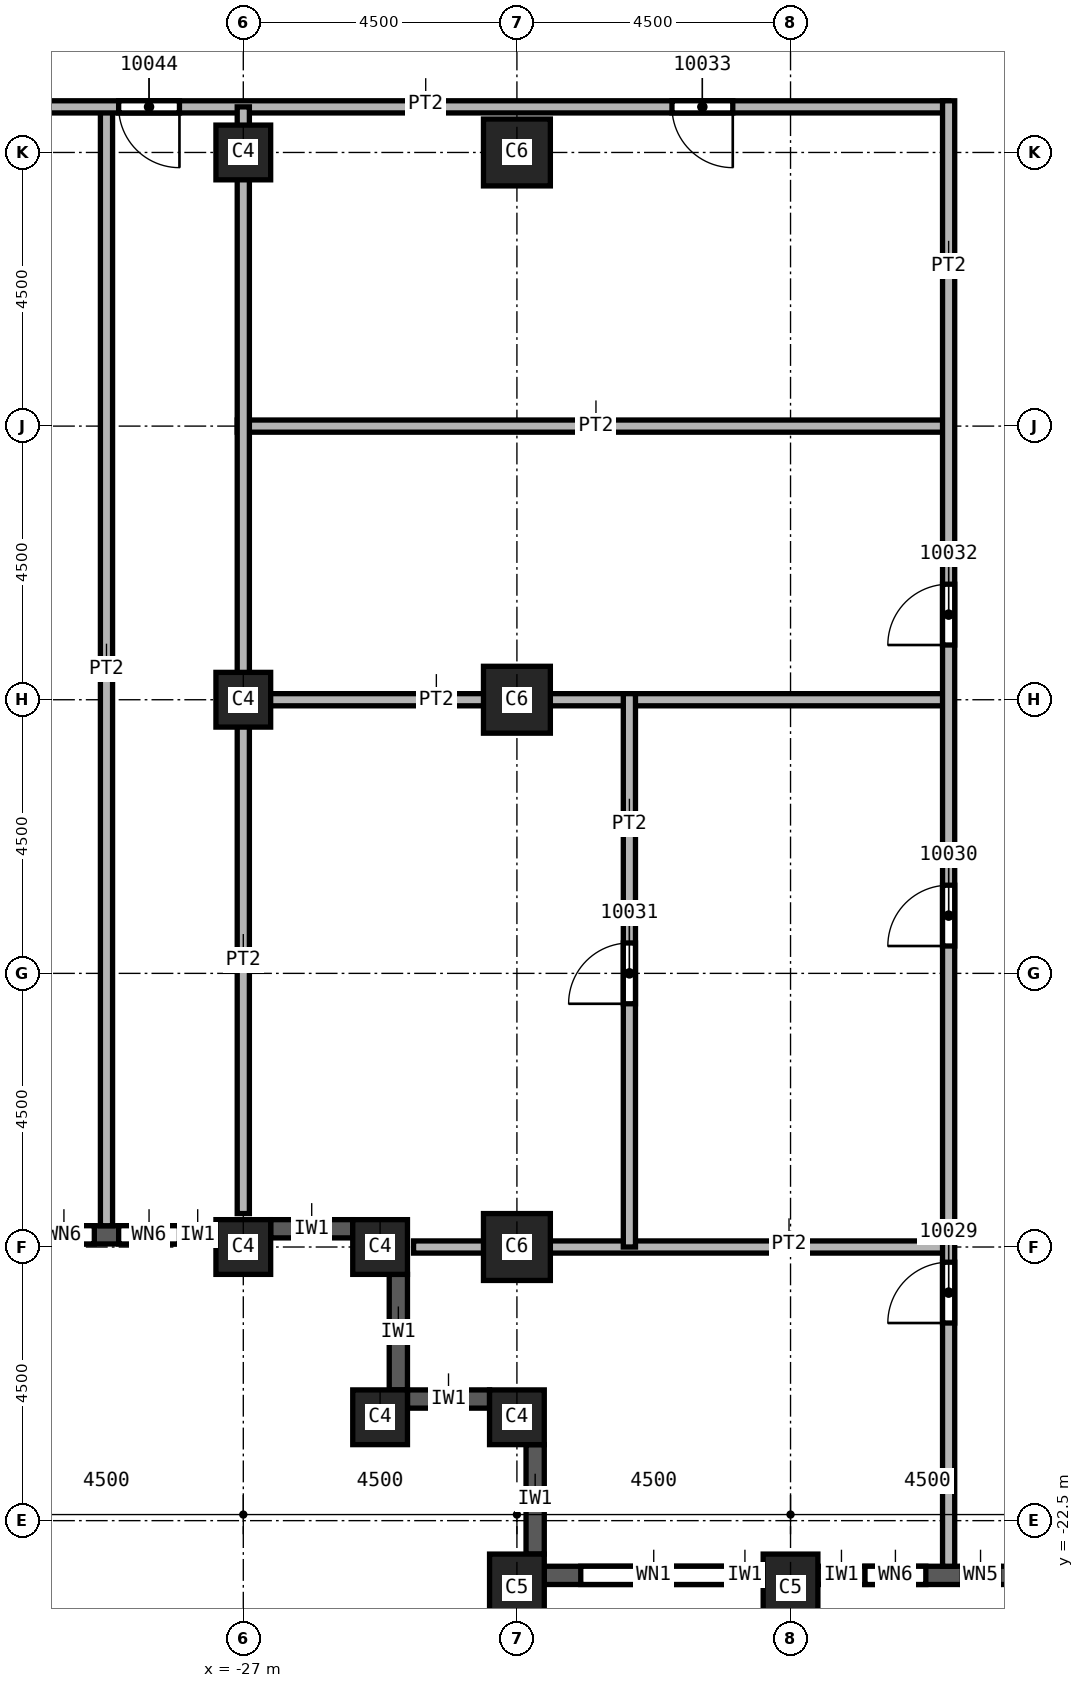
"""IFC4 building model, lengths in metres.
Left out: names, types, materials, properties, quantities, classifications, styles, units other than length and angle.
Written with IfcOpenShell. Run it as: python <this file> out.ifc"""

import sys

from ifc_helpers import new_model, si_unit, direction, frame, frame_2d, origin, origin_2d, place, context, subcontext, project, spatial, rectangle, extrude, element, fill, save


model = new_model("IFC4")
c1 = context("Model", 3, precision=1e-05, world=origin(), true_north=direction((0.0, 1.0)))
c2 = subcontext(c1, "Body", "Model", "MODEL_VIEW")
j1 = project(units=[si_unit("LENGTHUNIT", "METRE"), si_unit("PLANEANGLEUNIT", "RADIAN")], contexts=[c1])
p1 = place(None, origin())
s1 = spatial("IfcSite", under=j1, at=p1, CompositionType="ELEMENT")
p2 = place(p1, origin())
s2 = spatial("IfcBuilding", under=s1, at=p2, CompositionType="ELEMENT")
p3 = place(p2, frame((0.0, 0.0, 170.0)))
s3 = spatial("IfcBuildingStorey", under=s2, at=p3, CompositionType="ELEMENT", Elevation=170.0)
for number, where, z_axis, x_axis in (
    (1, (-22.5, 0.0, 0.0), (0.0, 0.0, 1.0), (1.0, 0.0, 0.0)),
    (2, (-22.5, -9.0, 0.0), (0.0, 0.0, 1.0), (1.0, 0.0, 0.0)),
    (3, (-22.5, -18.0, 0.0), (0.0, 0.0, 1.0), (1.0, 0.0, 0.0)),
):
    element("IfcColumn", number, at=place(p3, frame(where, z_axis=z_axis, x_axis=x_axis)), inside=s3, PredefinedType="COLUMN", context=c2, shape_type="SweptSolid", body=[
        extrude(rectangle(XDim=1.1, YDim=1.1, at=origin_2d()), origin(), (0.0, 0.0, 1.0), 3.7),
    ])
for number, where, z_axis, x_axis in (
    (4, (-18.0, -23.6, 0.0), (0.0, 0.0, 1.0), (1.0, 0.0, 0.0)),
    (5, (-22.5, -23.6, 0.0), (0.0, 0.0, 1.0), (1.0, 0.0, 0.0)),
):
    element("IfcColumn", number, at=place(p3, frame(where, z_axis=z_axis, x_axis=x_axis)), inside=s3, PredefinedType="COLUMN", context=c2, shape_type="SweptSolid", body=[
        extrude(rectangle(XDim=0.9, YDim=1.1, at=origin_2d()), origin(), (0.0, 0.0, 1.0), 3.7),
    ])
for number, where, z_axis, x_axis in (
    (6, (-27.0, 0.0, 0.0), (0.0, 0.0, 1.0), (1.0, 0.0, 0.0)),
    (7, (-27.0, -9.0, 0.0), (0.0, 0.0, 1.0), (1.0, 0.0, 0.0)),
    (8, (-27.0, -18.0, 0.0), (0.0, 0.0, 1.0), (1.0, 0.0, 0.0)),
    (9, (-22.5, -20.8, 0.0), (0.0, 0.0, 1.0), (1.0, 0.0, 0.0)),
    (10, (-24.75, -20.8, 0.0), (0.0, 0.0, 1.0), (1.0, 0.0, 0.0)),
    (11, (-24.75, -18.0, 0.0), (0.0, 0.0, 1.0), (1.0, 0.0, 0.0)),
):
    element("IfcColumn", number, at=place(p3, frame(where, z_axis=z_axis, x_axis=x_axis)), inside=s3, PredefinedType="COLUMN", context=c2, shape_type="SweptSolid", body=[
        extrude(rectangle(XDim=0.9, YDim=0.9, at=origin_2d()), origin(), (0.0, 0.0, 1.0), 3.7),
    ])
p4 = place(p3, frame((-31.05, -17.8, 0.0), z_axis=(0.0, 0.0, 1.0), x_axis=(1.0, 0.0, 0.0)))
e12 = element("IfcWall", 12, at=p4, inside=s3, PredefinedType="SOLIDWALL", context=c2, shape_type="SweptSolid", body=[
    extrude(rectangle(XDim=3.6, YDim=0.3, at=frame_2d((1.8, 0.0))), origin(), (0.0, 0.0, 1.0), 3.1),
])
p5 = place(p4, frame((0.6, 0.0, 0.8)))
e13 = element("IfcOpeningElement", 13, at=p5, cuts=e12, PredefinedType="OPENING", context=c2, shape_type="SweptSolid", body=[
    extrude(rectangle(XDim=1.0, YDim=1.95, at=frame_2d((0.5, 0.975))), frame((0.0, 0.15, 0.0), z_axis=(0.0, -1.0, 0.0), x_axis=(1.0, 0.0, 0.0)), (0.0, 0.0, 1.0), 0.3),
])
p6 = place(p4, frame((2.0, 0.0, 0.8)))
e14 = element("IfcOpeningElement", 14, at=p6, cuts=e12, PredefinedType="OPENING", context=c2, shape_type="SweptSolid", body=[
    extrude(rectangle(XDim=1.0, YDim=1.95, at=frame_2d((0.5, 0.975))), frame((0.0, 0.15, 0.0), z_axis=(0.0, -1.0, 0.0), x_axis=(1.0, 0.0, 0.0)), (0.0, 0.0, 1.0), 0.3),
])
p7 = place(p3, frame((-26.55, -17.7, 0.0), z_axis=(0.0, 0.0, 1.0), x_axis=(1.0, 0.0, 0.0)))
e15 = element("IfcWall", 15, at=p7, inside=s3, PredefinedType="SOLIDWALL", context=c2, shape_type="SweptSolid", body=[
    extrude(rectangle(XDim=1.35, YDim=0.3, at=frame_2d((0.675, 0.0))), origin(), (0.0, 0.0, 1.0), 3.1),
])
p8 = place(p3, frame((-24.45, -18.45, 0.0), z_axis=(0.0, 0.0, 1.0), x_axis=(0.0, -1.0, 0.0)))
e16 = element("IfcWall", 16, at=p8, inside=s3, PredefinedType="SOLIDWALL", context=c2, shape_type="SweptSolid", body=[
    extrude(rectangle(XDim=1.9, YDim=0.3, at=frame_2d((0.95, 0.0))), origin(), (0.0, 0.0, 1.0), 3.1),
])
p9 = place(p3, frame((-24.3, -20.5, 0.0), z_axis=(0.0, 0.0, 1.0), x_axis=(1.0, 0.0, 0.0)))
e17 = element("IfcWall", 17, at=p9, inside=s3, PredefinedType="SOLIDWALL", context=c2, shape_type="SweptSolid", body=[
    extrude(rectangle(XDim=1.35, YDim=0.3, at=frame_2d((0.675, 0.0))), origin(), (0.0, 0.0, 1.0), 3.1),
])
p10 = place(p3, frame((-22.2, -21.25, 0.0), z_axis=(0.0, 0.0, 1.0), x_axis=(0.0, -1.0, 0.0)))
e18 = element("IfcWall", 18, at=p10, inside=s3, PredefinedType="SOLIDWALL", context=c2, shape_type="SweptSolid", body=[
    extrude(rectangle(XDim=1.8, YDim=0.3, at=frame_2d((0.9, 0.0))), origin(), (0.0, 0.0, 1.0), 3.1),
])
p11 = place(p3, frame((-22.05, -23.4, 0.0), z_axis=(0.0, 0.0, 1.0), x_axis=(1.0, 0.0, 0.0)))
e19 = element("IfcWall", 19, at=p11, inside=s3, PredefinedType="SOLIDWALL", context=c2, shape_type="SweptSolid", body=[
    extrude(rectangle(XDim=3.6, YDim=0.3, at=frame_2d((1.8, 0.0))), origin(), (0.0, 0.0, 1.0), 3.1),
])
p12 = place(p11, frame((0.6, 0.0, 0.8)))
e20 = element("IfcOpeningElement", 20, at=p12, cuts=e19, PredefinedType="OPENING", context=c2, shape_type="SweptSolid", body=[
    extrude(rectangle(XDim=2.4, YDim=1.95, at=frame_2d((1.2, 0.975))), frame((0.0, 0.15, 0.0), z_axis=(0.0, -1.0, 0.0), x_axis=(1.0, 0.0, 0.0)), (0.0, 0.0, 1.0), 0.3),
])
p13 = place(p3, frame((-17.55, -23.4, 0.0), z_axis=(0.0, 0.0, 1.0), x_axis=(1.0, 0.0, 0.0)))
e21 = element("IfcWall", 21, at=p13, inside=s3, PredefinedType="SOLIDWALL", context=c2, shape_type="SweptSolid", body=[
    extrude(rectangle(XDim=3.6, YDim=0.3, at=frame_2d((1.8, 0.0))), origin(), (0.0, 0.0, 1.0), 3.1),
])
p14 = place(p13, frame((0.775, 0.0, 0.8)))
e22 = element("IfcOpeningElement", 22, at=p14, cuts=e21, PredefinedType="OPENING", context=c2, shape_type="SweptSolid", body=[
    extrude(rectangle(XDim=1.0, YDim=1.95, at=frame_2d((0.5, 0.975))), frame((0.0, 0.15, 0.0), z_axis=(0.0, -1.0, 0.0), x_axis=(1.0, 0.0, 0.0)), (0.0, 0.0, 1.0), 0.3),
])
p15 = place(p13, frame((2.375, 0.0, 0.8)))
e23 = element("IfcOpeningElement", 23, at=p15, cuts=e21, PredefinedType="OPENING", context=c2, shape_type="SweptSolid", body=[
    extrude(rectangle(XDim=0.6, YDim=1.95, at=frame_2d((0.3, 0.975))), frame((0.0, 0.15, 0.0), z_axis=(0.0, -1.0, 0.0), x_axis=(1.0, 0.0, 0.0)), (0.0, 0.0, 1.0), 0.3),
])
p16 = place(p3, frame((-29.25, 0.75, 0.0), z_axis=(0.0, 0.0, 1.0), x_axis=(0.0, -1.0, 0.0)))
e24 = element("IfcWall", 24, at=p16, inside=s3, PredefinedType="PARTITIONING", context=c2, shape_type="SweptSolid", body=[
    extrude(rectangle(XDim=18.4, YDim=0.2, at=frame_2d((9.2, 0.0))), origin(), (0.0, 0.0, 1.0), 3.7),
])
p17 = place(p3, frame((-15.4, 0.75, 0.0), z_axis=(0.0, 0.0, 1.0), x_axis=(-1.0, 0.0, 0.0)))
e25 = element("IfcWall", 25, at=p17, inside=s3, PredefinedType="PARTITIONING", context=c2, shape_type="SweptSolid", body=[
    extrude(rectangle(XDim=18.45, YDim=0.2, at=frame_2d((9.225, 0.0))), origin(), (0.0, 0.0, 1.0), 3.7),
])
p18 = place(p17, frame((3.55, 0.0, 0.0)))
e26 = element("IfcOpeningElement", 26, at=p18, cuts=e25, PredefinedType="OPENING", context=c2, shape_type="SweptSolid", body=[
    extrude(rectangle(XDim=1.0, YDim=2.1, at=frame_2d((0.5, 1.05))), frame((0.0, 0.1, 0.0), z_axis=(0.0, -1.0, 0.0), x_axis=(1.0, 0.0, 0.0)), (0.0, 0.0, 1.0), 0.2),
])
p19 = place(p17, frame((12.65, 0.0, 0.0)))
e27 = element("IfcOpeningElement", 27, at=p19, cuts=e25, PredefinedType="OPENING", context=c2, shape_type="SweptSolid", body=[
    extrude(rectangle(XDim=1.0, YDim=2.1, at=frame_2d((0.5, 1.05))), frame((0.0, 0.1, 0.0), z_axis=(0.0, -1.0, 0.0), x_axis=(1.0, 0.0, 0.0)), (0.0, 0.0, 1.0), 0.2),
])
for number, where, z_axis, x_axis in (
    (28, (-27.1, -9.0, 0.0), (0.0, 0.0, 1.0), (1.0, 0.0, 0.0)),
    (29, (-27.1, -4.5, 0.0), (0.0, 0.0, 1.0), (1.0, 0.0, 0.0)),
):
    element("IfcWall", number, at=place(p3, frame(where, z_axis=z_axis, x_axis=x_axis)), inside=s3, PredefinedType="PARTITIONING", context=c2, shape_type="SweptSolid", body=[
        extrude(rectangle(XDim=11.7, YDim=0.2, at=frame_2d((5.85, 0.0))), origin(), (0.0, 0.0, 1.0), 3.7),
    ])
p20 = place(p3, frame((-27.0, -17.45, 0.0), z_axis=(0.0, 0.0, 1.0), x_axis=(0.0, 1.0, 0.0)))
e30 = element("IfcWall", 30, at=p20, inside=s3, PredefinedType="PARTITIONING", context=c2, shape_type="SweptSolid", body=[
    extrude(rectangle(XDim=18.2, YDim=0.2, at=frame_2d((9.1, 0.0))), origin(), (0.0, 0.0, 1.0), 3.7),
])
p21 = place(p3, frame((-24.2, -18.0, 0.0), z_axis=(0.0, 0.0, 1.0), x_axis=(1.0, 0.0, 0.0)))
e31 = element("IfcWall", 31, at=p21, inside=s3, PredefinedType="PARTITIONING", context=c2, shape_type="SweptSolid", body=[
    extrude(rectangle(XDim=8.8, YDim=0.2, at=frame_2d((4.4, 0.0))), origin(), (0.0, 0.0, 1.0), 3.7),
])
p22 = place(p3, frame((-20.65, -18.0, 0.0), z_axis=(0.0, 0.0, 1.0), x_axis=(0.0, 1.0, 0.0)))
e32 = element("IfcWall", 32, at=p22, inside=s3, PredefinedType="PARTITIONING", context=c2, shape_type="SweptSolid", body=[
    extrude(rectangle(XDim=9.1, YDim=0.2, at=frame_2d((4.55, 0.0))), origin(), (0.0, 0.0, 1.0), 3.7),
])
p23 = place(p22, frame((4.0, 0.0, 0.0)))
e33 = element("IfcOpeningElement", 33, at=p23, cuts=e32, PredefinedType="OPENING", context=c2, shape_type="SweptSolid", body=[
    extrude(rectangle(XDim=1.0, YDim=2.1, at=frame_2d((0.5, 1.05))), frame((0.0, 0.1, 0.0), z_axis=(0.0, -1.0, 0.0), x_axis=(1.0, 0.0, 0.0)), (0.0, 0.0, 1.0), 0.2),
])
p24 = place(p3, frame((-15.4, -23.25, 0.0), z_axis=(0.0, 0.0, 1.0), x_axis=(0.0, 1.0, 0.0)))
e34 = element("IfcWall", 34, at=p24, inside=s3, PredefinedType="PARTITIONING", context=c2, shape_type="SweptSolid", body=[
    extrude(rectangle(XDim=24.1, YDim=0.2, at=frame_2d((12.05, 0.0))), origin(), (0.0, 0.0, 1.0), 3.7),
])
p25 = place(p24, frame((4.0, 0.0, 0.0)))
e35 = element("IfcOpeningElement", 35, at=p25, cuts=e34, PredefinedType="OPENING", context=c2, shape_type="SweptSolid", body=[
    extrude(rectangle(XDim=1.0, YDim=2.1, at=frame_2d((0.5, 1.05))), frame((0.0, 0.1, 0.0), z_axis=(0.0, -1.0, 0.0), x_axis=(1.0, 0.0, 0.0)), (0.0, 0.0, 1.0), 0.2),
])
p26 = place(p24, frame((10.2, 0.0, 0.0)))
e36 = element("IfcOpeningElement", 36, at=p26, cuts=e34, PredefinedType="OPENING", context=c2, shape_type="SweptSolid", body=[
    extrude(rectangle(XDim=1.0, YDim=2.1, at=frame_2d((0.5, 1.05))), frame((0.0, 0.1, 0.0), z_axis=(0.0, -1.0, 0.0), x_axis=(1.0, 0.0, 0.0)), (0.0, 0.0, 1.0), 0.2),
])
p27 = place(p24, frame((15.15, 0.0, 0.0)))
e37 = element("IfcOpeningElement", 37, at=p27, cuts=e34, PredefinedType="OPENING", context=c2, shape_type="SweptSolid", body=[
    extrude(rectangle(XDim=1.0, YDim=2.1, at=frame_2d((0.5, 1.05))), frame((0.0, 0.1, 0.0), z_axis=(0.0, -1.0, 0.0), x_axis=(1.0, 0.0, 0.0)), (0.0, 0.0, 1.0), 0.2),
])
p28 = place(p12, origin())
e38 = element("IfcWindow", 38, at=p28, inside=s3, PartitioningType="SINGLE_PANEL", PredefinedType="WINDOW", context=c2, shape_type="SweptSolid", body=[
    extrude(rectangle(XDim=2.4, YDim=1.95, at=frame_2d((1.2, 0.975))), frame((0.0, 0.03, 0.0), z_axis=(0.0, -1.0, 0.0), x_axis=(1.0, 0.0, 0.0)), (0.0, 0.0, 1.0), 0.06),
])
fill(e20, e38)
p29 = place(p25, origin())
e39 = element("IfcDoor", 39, at=p29, inside=s3, OperationType="SINGLE_SWING_RIGHT", PredefinedType="DOOR", context=c2, shape_type="SweptSolid", body=[
    extrude(rectangle(XDim=1.0, YDim=2.1, at=frame_2d((0.5, 1.05))), frame((0.0, 0.025, 0.0), z_axis=(0.0, -1.0, 0.0), x_axis=(1.0, 0.0, 0.0)), (0.0, 0.0, 1.0), 0.05),
])
fill(e35, e39)
p30 = place(p26, origin())
e40 = element("IfcDoor", 40, at=p30, inside=s3, OperationType="SINGLE_SWING_LEFT", PredefinedType="DOOR", context=c2, shape_type="SweptSolid", body=[
    extrude(rectangle(XDim=1.0, YDim=2.1, at=frame_2d((0.5, 1.05))), frame((0.0, 0.025, 0.0), z_axis=(0.0, -1.0, 0.0), x_axis=(1.0, 0.0, 0.0)), (0.0, 0.0, 1.0), 0.05),
])
fill(e36, e40)
p31 = place(p23, origin())
e41 = element("IfcDoor", 41, at=p31, inside=s3, OperationType="SINGLE_SWING_RIGHT", PredefinedType="DOOR", context=c2, shape_type="SweptSolid", body=[
    extrude(rectangle(XDim=1.0, YDim=2.1, at=frame_2d((0.5, 1.05))), frame((0.0, 0.025, 0.0), z_axis=(0.0, -1.0, 0.0), x_axis=(1.0, 0.0, 0.0)), (0.0, 0.0, 1.0), 0.05),
])
fill(e33, e41)
p32 = place(p27, origin())
e42 = element("IfcDoor", 42, at=p32, inside=s3, OperationType="SINGLE_SWING_LEFT", PredefinedType="DOOR", context=c2, shape_type="SweptSolid", body=[
    extrude(rectangle(XDim=1.0, YDim=2.1, at=frame_2d((0.5, 1.05))), frame((0.0, 0.025, 0.0), z_axis=(0.0, -1.0, 0.0), x_axis=(1.0, 0.0, 0.0)), (0.0, 0.0, 1.0), 0.05),
])
fill(e37, e42)
p33 = place(p18, origin())
e43 = element("IfcDoor", 43, at=p33, inside=s3, OperationType="SINGLE_SWING_RIGHT", PredefinedType="DOOR", context=c2, shape_type="SweptSolid", body=[
    extrude(rectangle(XDim=1.0, YDim=2.1, at=frame_2d((0.5, 1.05))), frame((0.0, 0.025, 0.0), z_axis=(0.0, -1.0, 0.0), x_axis=(1.0, 0.0, 0.0)), (0.0, 0.0, 1.0), 0.05),
])
fill(e26, e43)
p34 = place(p19, origin())
e44 = element("IfcDoor", 44, at=p34, inside=s3, OperationType="SINGLE_SWING_LEFT", PredefinedType="DOOR", context=c2, shape_type="SweptSolid", body=[
    extrude(rectangle(XDim=1.0, YDim=2.1, at=frame_2d((0.5, 1.05))), frame((0.0, 0.025, 0.0), z_axis=(0.0, -1.0, 0.0), x_axis=(1.0, 0.0, 0.0)), (0.0, 0.0, 1.0), 0.05),
])
fill(e27, e44)
p35 = place(p5, origin())
e45 = element("IfcWindow", 45, at=p35, inside=s3, PartitioningType="SINGLE_PANEL", PredefinedType="WINDOW", context=c2, shape_type="SweptSolid", body=[
    extrude(rectangle(XDim=1.0, YDim=1.95, at=frame_2d((0.5, 0.975))), frame((0.0, 0.03, 0.0), z_axis=(0.0, -1.0, 0.0), x_axis=(1.0, 0.0, 0.0)), (0.0, 0.0, 1.0), 0.06),
])
fill(e13, e45)
p36 = place(p6, origin())
e46 = element("IfcWindow", 46, at=p36, inside=s3, PartitioningType="SINGLE_PANEL", PredefinedType="WINDOW", context=c2, shape_type="SweptSolid", body=[
    extrude(rectangle(XDim=1.0, YDim=1.95, at=frame_2d((0.5, 0.975))), frame((0.0, 0.03, 0.0), z_axis=(0.0, -1.0, 0.0), x_axis=(1.0, 0.0, 0.0)), (0.0, 0.0, 1.0), 0.06),
])
fill(e14, e46)
p37 = place(p14, origin())
e47 = element("IfcWindow", 47, at=p37, inside=s3, PartitioningType="SINGLE_PANEL", PredefinedType="WINDOW", context=c2, shape_type="SweptSolid", body=[
    extrude(rectangle(XDim=1.0, YDim=1.95, at=frame_2d((0.5, 0.975))), frame((0.0, 0.03, 0.0), z_axis=(0.0, -1.0, 0.0), x_axis=(1.0, 0.0, 0.0)), (0.0, 0.0, 1.0), 0.06),
])
fill(e22, e47)
p38 = place(p15, origin())
e48 = element("IfcWindow", 48, at=p38, inside=s3, PartitioningType="SINGLE_PANEL", PredefinedType="WINDOW", context=c2, shape_type="SweptSolid", body=[
    extrude(rectangle(XDim=0.6, YDim=1.95, at=frame_2d((0.3, 0.975))), frame((0.0, 0.03, 0.0), z_axis=(0.0, -1.0, 0.0), x_axis=(1.0, 0.0, 0.0)), (0.0, 0.0, 1.0), 0.06),
])
fill(e23, e48)
save(model, sys.argv[1])
